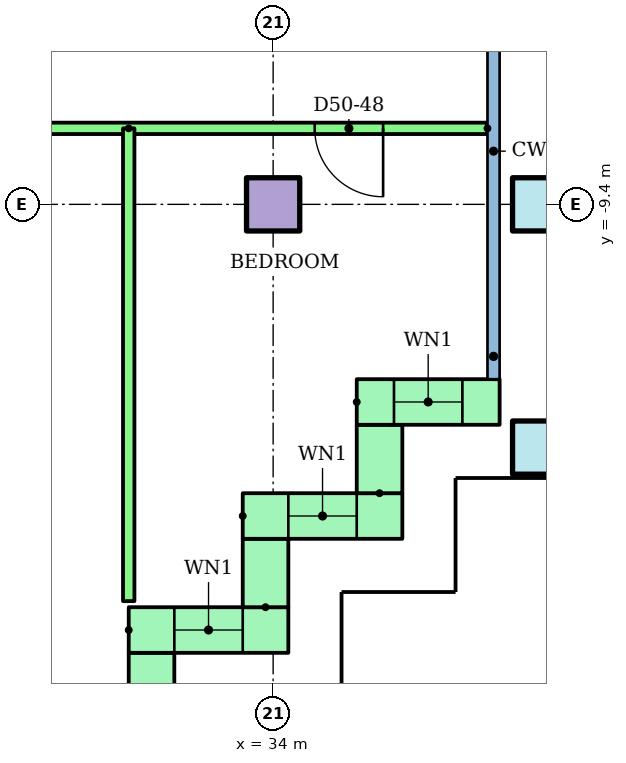
"""IFC4 building model, lengths in metres.
Left out: names, types, materials, properties, quantities, classifications, styles, units other than length and angle.
Written with IfcOpenShell. Run it as: python <this file> out.ifc"""

import sys

from ifc_helpers import new_model, si_unit, direction, frame, frame_2d, origin, origin_2d, place, context, subcontext, project, spatial, rectangle, hollow_rectangle, extrude, element, fill, save


model = new_model("IFC4")
c1 = context("Model", 3, precision=1e-05, world=origin(), true_north=direction((0.0, 1.0)))
c2 = subcontext(c1, "Body", "Model", "MODEL_VIEW")
j1 = project(units=[si_unit("LENGTHUNIT", "METRE"), si_unit("PLANEANGLEUNIT", "RADIAN")], contexts=[c1])
p1 = place(None, origin())
s1 = spatial("IfcSite", under=j1, at=p1, CompositionType="ELEMENT")
p2 = place(p1, origin())
s2 = spatial("IfcBuilding", under=s1, at=p2, CompositionType="ELEMENT")
p3 = place(p2, frame((0.0, 0.0, 190.9)))
s3 = spatial("IfcBuildingStorey", under=s2, at=p3, CompositionType="ELEMENT", Elevation=190.9)
p4 = place(p3, frame((37.5, -12.6, 0.0)))
e1 = element("IfcColumn", 1, at=p4, inside=s3, PredefinedType="COLUMN", context=c2, shape_type="SweptSolid", body=[
    extrude(hollow_rectangle(XDim=0.7, YDim=0.7, WallThickness=0.036, at=origin_2d()), origin(), (0.0, 0.0, 1.0), 3.2),
])
p5 = place(p3, frame((34.0, -9.4, 0.0)))
e2 = element("IfcColumn", 2, at=p5, inside=s3, PredefinedType="COLUMN", context=c2, shape_type="SweptSolid", body=[
    extrude(rectangle(XDim=0.7, YDim=0.7, at=origin_2d()), origin(), (0.0, 0.0, 1.0), 3.2),
])
p6 = place(p3, frame((37.5, -9.4, 0.0)))
e3 = element("IfcColumn", 3, at=p6, inside=s3, PredefinedType="COLUMN", context=c2, shape_type="SweptSolid", body=[
    extrude(hollow_rectangle(XDim=0.7, YDim=0.7, WallThickness=0.036, at=origin_2d()), origin(), (0.0, 0.0, 1.0), 3.2),
])
p7 = place(p3, frame((32.4, -16.58, 0.0), z_axis=(0.0, 0.0, 1.0), x_axis=(0.0, 1.0, 0.0)))
e4 = element("IfcWall", 4, at=p7, inside=s3, PredefinedType="STANDARD", context=c2, shape_type="SweptSolid", body=[
    extrude(rectangle(XDim=1.28, YDim=0.6, at=frame_2d((0.64, 0.0))), origin(), (0.0, 0.0, 1.0), 2.8),
])
p8 = place(p3, frame((32.1, -15.0, 0.0)))
e5 = element("IfcWall", 5, at=p8, inside=s3, PredefinedType="STANDARD", context=c2, shape_type="SweptSolid", body=[
    extrude(rectangle(XDim=2.1, YDim=0.6, at=frame_2d((1.05, 0.0))), origin(), (0.0, 0.0, 1.0), 2.8),
])
p9 = place(p8, frame((0.6, 0.0, 0.9)))
e6 = element("IfcOpeningElement", 6, at=p9, cuts=e5, PredefinedType="OPENING", context=c2, shape_type="SweptSolid", body=[
    extrude(rectangle(XDim=0.9, YDim=1.5, at=frame_2d((0.45, 0.75))), frame((0.0, 0.31, 0.0), z_axis=(0.0, -1.0, 0.0), x_axis=(1.0, 0.0, 0.0)), (0.0, 0.0, 1.0), 0.62),
])
p10 = place(p3, frame((33.9, -14.7, 0.0), z_axis=(0.0, 0.0, 1.0), x_axis=(0.0, 1.0, 0.0)))
e7 = element("IfcWall", 7, at=p10, inside=s3, PredefinedType="STANDARD", context=c2, shape_type="SweptSolid", body=[
    extrude(rectangle(XDim=0.9, YDim=0.6, at=frame_2d((0.45, 0.0))), origin(), (0.0, 0.0, 1.0), 2.8),
])
p11 = place(p3, frame((33.6, -13.5, 0.0)))
e8 = element("IfcWall", 8, at=p11, inside=s3, PredefinedType="STANDARD", context=c2, shape_type="SweptSolid", body=[
    extrude(rectangle(XDim=2.1, YDim=0.6, at=frame_2d((1.05, 0.0))), origin(), (0.0, 0.0, 1.0), 2.8),
])
p12 = place(p11, frame((0.6, 0.0, 0.9)))
e9 = element("IfcOpeningElement", 9, at=p12, cuts=e8, PredefinedType="OPENING", context=c2, shape_type="SweptSolid", body=[
    extrude(rectangle(XDim=0.9, YDim=1.5, at=frame_2d((0.45, 0.75))), frame((0.0, 0.31, 0.0), z_axis=(0.0, -1.0, 0.0), x_axis=(1.0, 0.0, 0.0)), (0.0, 0.0, 1.0), 0.62),
])
p13 = place(p3, frame((35.4, -13.2, 0.0), z_axis=(0.0, 0.0, 1.0), x_axis=(0.0, 1.0, 0.0)))
e10 = element("IfcWall", 10, at=p13, inside=s3, PredefinedType="STANDARD", context=c2, shape_type="SweptSolid", body=[
    extrude(rectangle(XDim=0.9, YDim=0.6, at=frame_2d((0.45, 0.0))), origin(), (0.0, 0.0, 1.0), 2.8),
])
p14 = place(p3, frame((35.1, -12.0, 0.0)))
e11 = element("IfcWall", 11, at=p14, inside=s3, PredefinedType="STANDARD", context=c2, shape_type="SweptSolid", body=[
    extrude(rectangle(XDim=1.88, YDim=0.6, at=frame_2d((0.94, 0.0))), origin(), (0.0, 0.0, 1.0), 2.8),
])
p15 = place(p14, frame((0.49, 0.0, 0.9)))
e12 = element("IfcOpeningElement", 12, at=p15, cuts=e11, PredefinedType="OPENING", context=c2, shape_type="SweptSolid", body=[
    extrude(rectangle(XDim=0.9, YDim=1.5, at=frame_2d((0.45, 0.75))), frame((0.0, 0.31, 0.0), z_axis=(0.0, -1.0, 0.0), x_axis=(1.0, 0.0, 0.0)), (0.0, 0.0, 1.0), 0.62),
])
p16 = place(p3, frame((36.82, -8.4, 0.0), z_axis=(0.0, 0.0, 1.0), x_axis=(-1.0, 0.0, 0.0)))
e13 = element("IfcWall", 13, at=p16, inside=s3, PredefinedType="PARTITIONING", context=c2, shape_type="SweptSolid", body=[
    extrude(rectangle(XDim=18.82, YDim=0.15, at=frame_2d((9.41, 0.0))), origin(), (0.0, 0.0, 1.0), 2.4),
])
p17 = place(p16, frame((16.37, 0.0, 0.0)))
e14 = element("IfcOpeningElement", 14, at=p17, cuts=e13, PredefinedType="OPENING", context=c2, shape_type="SweptSolid", body=[
    extrude(rectangle(XDim=0.9, YDim=2.1, at=frame_2d((0.45, 1.05))), frame((0.0, 0.085, 0.0), z_axis=(0.0, -1.0, 0.0), x_axis=(1.0, 0.0, 0.0)), (0.0, 0.0, 1.0), 0.17),
])
p18 = place(p16, frame((12.37, 0.0, 0.0)))
e15 = element("IfcOpeningElement", 15, at=p18, cuts=e13, PredefinedType="OPENING", context=c2, shape_type="SweptSolid", body=[
    extrude(rectangle(XDim=0.9, YDim=2.1, at=frame_2d((0.45, 1.05))), frame((0.0, 0.085, 0.0), z_axis=(0.0, -1.0, 0.0), x_axis=(1.0, 0.0, 0.0)), (0.0, 0.0, 1.0), 0.17),
])
p19 = place(p16, frame((7.27, 0.0, 0.0)))
e16 = element("IfcOpeningElement", 16, at=p19, cuts=e13, PredefinedType="OPENING", context=c2, shape_type="SweptSolid", body=[
    extrude(rectangle(XDim=1.0, YDim=2.1, at=frame_2d((0.5, 1.05))), frame((0.0, 0.085, 0.0), z_axis=(0.0, -1.0, 0.0), x_axis=(1.0, 0.0, 0.0)), (0.0, 0.0, 1.0), 0.17),
])
p20 = place(p16, frame((1.373, 0.0, 0.0)))
e17 = element("IfcOpeningElement", 17, at=p20, cuts=e13, PredefinedType="OPENING", context=c2, shape_type="SweptSolid", body=[
    extrude(rectangle(XDim=0.9, YDim=2.1, at=frame_2d((0.45, 1.05))), frame((0.0, 0.085, 0.0), z_axis=(0.0, -1.0, 0.0), x_axis=(1.0, 0.0, 0.0)), (0.0, 0.0, 1.0), 0.17),
])
p21 = place(p3, frame((32.1, -8.4, 0.0), z_axis=(0.0, 0.0, 1.0), x_axis=(0.0, -1.0, 0.0)))
e18 = element("IfcWall", 18, at=p21, inside=s3, PredefinedType="PARTITIONING", context=c2, shape_type="SweptSolid", body=[
    extrude(rectangle(XDim=6.22, YDim=0.15, at=frame_2d((3.11, 0.0))), origin(), (0.0, 0.0, 1.0), 2.4),
])
p22 = place(p9, origin())
e19 = element("IfcWindow", 19, at=p22, inside=s3, PartitioningType="SINGLE_PANEL", PredefinedType="WINDOW", context=c2, shape_type="SweptSolid", body=[
    extrude(rectangle(XDim=0.9, YDim=1.5, at=frame_2d((0.45, 0.75))), frame((0.0, 0.03, 0.0), z_axis=(0.0, -1.0, 0.0), x_axis=(1.0, 0.0, 0.0)), (0.0, 0.0, 1.0), 0.06),
])
fill(e6, e19)
p23 = place(p12, origin())
e20 = element("IfcWindow", 20, at=p23, inside=s3, PartitioningType="SINGLE_PANEL", PredefinedType="WINDOW", context=c2, shape_type="SweptSolid", body=[
    extrude(rectangle(XDim=0.9, YDim=1.5, at=frame_2d((0.45, 0.75))), frame((0.0, 0.03, 0.0), z_axis=(0.0, -1.0, 0.0), x_axis=(1.0, 0.0, 0.0)), (0.0, 0.0, 1.0), 0.06),
])
fill(e9, e20)
p24 = place(p15, origin())
e21 = element("IfcWindow", 21, at=p24, inside=s3, PartitioningType="SINGLE_PANEL", PredefinedType="WINDOW", context=c2, shape_type="SweptSolid", body=[
    extrude(rectangle(XDim=0.9, YDim=1.5, at=frame_2d((0.45, 0.75))), frame((0.0, 0.03, 0.0), z_axis=(0.0, -1.0, 0.0), x_axis=(1.0, 0.0, 0.0)), (0.0, 0.0, 1.0), 0.06),
])
fill(e12, e21)
p25 = place(p20, origin())
e22 = element("IfcDoor", 22, at=p25, inside=s3, OperationType="SINGLE_SWING_LEFT", PredefinedType="DOOR", context=c2, shape_type="SweptSolid", body=[
    extrude(rectangle(XDim=0.9, YDim=2.1, at=frame_2d((0.45, 1.05))), frame((0.0, 0.025, 0.0), z_axis=(0.0, -1.0, 0.0), x_axis=(1.0, 0.0, 0.0)), (0.0, 0.0, 1.0), 0.05),
])
fill(e17, e22)
save(model, sys.argv[1])
